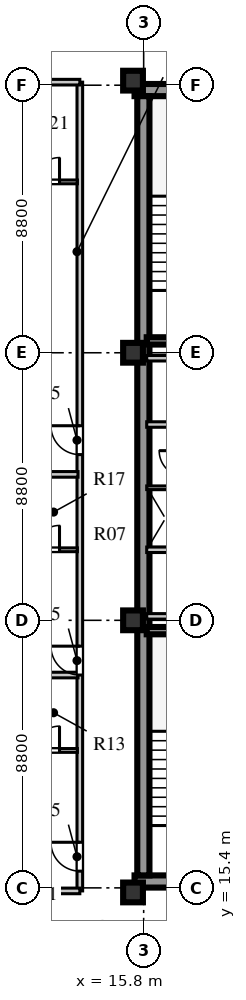
"""IFC4 building model, lengths in metres.
Left out: names, types, materials, properties, quantities, classifications, styles, units other than length and angle.
Written with IfcOpenShell. Run it as: python <this file> out.ifc"""

import sys

from ifc_helpers import new_model, si_unit, direction, frame, frame_2d, origin, origin_2d, place, context, subcontext, project, spatial, rectangle, extrude, element, fill, save


model = new_model("IFC4")
c1 = context("Model", 3, precision=1e-05, world=origin(), true_north=direction((0.0, 1.0)))
c2 = subcontext(c1, "Body", "Model", "MODEL_VIEW")
j1 = project(units=[si_unit("LENGTHUNIT", "METRE"), si_unit("PLANEANGLEUNIT", "RADIAN")], contexts=[c1])
p1 = place(None, origin())
s1 = spatial("IfcSite", under=j1, at=p1, CompositionType="ELEMENT")
p2 = place(p1, origin())
s2 = spatial("IfcBuilding", under=s1, at=p2, CompositionType="ELEMENT")
p3 = place(p2, frame((0.0, 0.0, 260.9)))
s3 = spatial("IfcBuildingStorey", under=s2, at=p3, CompositionType="ELEMENT", Elevation=260.9)
for number, where, z_axis, x_axis in (
    (1, (15.5, 15.61, 0.0), (0.0, 0.0, 1.0), (1.0, 0.0, 0.0)),
    (2, (15.5, 41.64, 0.0), (0.0, 0.0, 1.0), (1.0, 0.0, 0.0)),
):
    element("IfcWall", number, at=place(p3, frame(where, z_axis=z_axis, x_axis=x_axis)), inside=s3, PredefinedType="SHEAR", context=c2, shape_type="SweptSolid", body=[
        extrude(rectangle(XDim=9.48, YDim=0.4, at=frame_2d((4.74, 0.0))), origin(), (0.0, 0.0, 1.0), 3.66),
    ])
p4 = place(p3, frame((15.79, 15.81, 0.0), z_axis=(0.0, 0.0, 1.0), x_axis=(0.0, 1.0, 0.0)))
e3 = element("IfcWall", 3, at=p4, inside=s3, PredefinedType="SHEAR", context=c2, shape_type="SweptSolid", body=[
    extrude(rectangle(XDim=25.63, YDim=0.4, at=frame_2d((12.815, 0.0))), origin(), (0.0, 0.0, 1.0), 3.66),
])
for number, where, z_axis, x_axis in (
    (4, (15.45, 15.25, 0.0), (0.0, 0.0, 1.0), (1.0, 0.0, 0.0)),
    (5, (15.45, 24.2, 0.0), (0.0, 0.0, 1.0), (1.0, 0.0, 0.0)),
    (6, (15.45, 33.0, 0.0), (0.0, 0.0, 1.0), (1.0, 0.0, 0.0)),
    (7, (15.45, 41.95, 0.0), (0.0, 0.0, 1.0), (1.0, 0.0, 0.0)),
):
    element("IfcColumn", number, at=place(p3, frame(where, z_axis=z_axis, x_axis=x_axis)), inside=s3, PredefinedType="COLUMN", context=c2, shape_type="SweptSolid", body=[
        extrude(rectangle(XDim=0.65, YDim=0.65, at=origin_2d()), origin(), (0.0, 0.0, 1.0), 3.66),
    ])
p5 = place(p3, frame((15.9, 23.86, 0.0), z_axis=(0.0, 0.0, 1.0), x_axis=(1.0, 0.0, 0.0)))
e8 = element("IfcWall", 8, at=p5, inside=s3, PredefinedType="SHEAR", context=c2, shape_type="SweptSolid", body=[
    extrude(rectangle(XDim=3.52, YDim=0.24, at=frame_2d((1.76, 0.0))), origin(), (0.0, 0.0, 1.0), 3.9),
])
p6 = place(p3, frame((15.9, 26.52, 0.0), z_axis=(0.0, 0.0, 1.0), x_axis=(1.0, 0.0, 0.0)))
e9 = element("IfcWall", 9, at=p6, inside=s3, PredefinedType="SOLIDWALL", context=c2, shape_type="SweptSolid", body=[
    extrude(rectangle(XDim=8.68, YDim=0.18, at=frame_2d((4.34, 0.0))), origin(), (0.0, 0.0, 1.0), 3.66),
])
p7 = place(p6, frame((2.5, 0.0, 0.0)))
e10 = element("IfcOpeningElement", 10, at=p7, cuts=e9, PredefinedType="OPENING", context=c2, shape_type="SweptSolid", body=[
    extrude(rectangle(XDim=0.95, YDim=2.1, at=frame_2d((0.475, 1.05))), frame((0.0, 0.1, 0.0), z_axis=(0.0, -1.0, 0.0), x_axis=(1.0, 0.0, 0.0)), (0.0, 0.0, 1.0), 0.2),
])
p8 = place(p6, frame((6.0, 0.0, 0.0)))
e11 = element("IfcOpeningElement", 11, at=p8, cuts=e9, PredefinedType="OPENING", context=c2, shape_type="SweptSolid", body=[
    extrude(rectangle(XDim=0.95, YDim=2.1, at=frame_2d((0.475, 1.05))), frame((0.0, 0.1, 0.0), z_axis=(0.0, -1.0, 0.0), x_axis=(1.0, 0.0, 0.0)), (0.0, 0.0, 1.0), 0.2),
])
p9 = place(p3, frame((15.9, 24.33, 0.0), z_axis=(0.0, 0.0, 1.0), x_axis=(1.0, 0.0, 0.0)))
e12 = element("IfcWall", 12, at=p9, inside=s3, PredefinedType="SOLIDWALL", context=c2, shape_type="SweptSolid", body=[
    extrude(rectangle(XDim=8.68, YDim=0.18, at=frame_2d((4.34, 0.0))), origin(), (0.0, 0.0, 1.0), 3.06),
])
p10 = place(p3, frame((15.9, 28.56, 0.0), z_axis=(0.0, 0.0, 1.0), x_axis=(1.0, 0.0, 0.0)))
e13 = element("IfcWall", 13, at=p10, inside=s3, PredefinedType="PARTITIONING", context=c2, shape_type="SweptSolid", body=[
    extrude(rectangle(XDim=1.2, YDim=0.12, at=frame_2d((0.6, 0.0))), origin(), (0.0, 0.0, 1.0), 3.66),
])
p11 = place(p3, frame((15.9, 30.64, 0.0), z_axis=(0.0, 0.0, 1.0), x_axis=(1.0, 0.0, 0.0)))
e14 = element("IfcWall", 14, at=p11, inside=s3, PredefinedType="SOLIDWALL", context=c2, shape_type="SweptSolid", body=[
    extrude(rectangle(XDim=8.68, YDim=0.18, at=frame_2d((4.34, 0.0))), origin(), (0.0, 0.0, 1.0), 3.66),
])
p12 = place(p11, frame((3.7, 0.0, 0.0)))
e15 = element("IfcOpeningElement", 15, at=p12, cuts=e14, PredefinedType="OPENING", context=c2, shape_type="SweptSolid", body=[
    extrude(rectangle(XDim=0.95, YDim=2.1, at=frame_2d((0.475, 1.05))), frame((0.0, 0.1, 0.0), z_axis=(0.0, -1.0, 0.0), x_axis=(1.0, 0.0, 0.0)), (0.0, 0.0, 1.0), 0.2),
])
p13 = place(p3, frame((15.9, 32.82, 0.0), z_axis=(0.0, 0.0, 1.0), x_axis=(1.0, 0.0, 0.0)))
e16 = element("IfcWall", 16, at=p13, inside=s3, PredefinedType="SOLIDWALL", context=c2, shape_type="SweptSolid", body=[
    extrude(rectangle(XDim=8.68, YDim=0.18, at=frame_2d((4.34, 0.0))), origin(), (0.0, 0.0, 1.0), 3.06),
])
p14 = place(p3, frame((15.9, 33.39, 0.0), z_axis=(0.0, 0.0, 1.0), x_axis=(1.0, 0.0, 0.0)))
e17 = element("IfcWall", 17, at=p14, inside=s3, PredefinedType="SHEAR", context=c2, shape_type="SweptSolid", body=[
    extrude(rectangle(XDim=3.52, YDim=0.24, at=frame_2d((1.76, 0.0))), origin(), (0.0, 0.0, 1.0), 3.9),
])
p15 = place(p3, frame((13.7, 15.3, 0.0), z_axis=(0.0, 0.0, 1.0), x_axis=(0.0, 1.0, 0.0)))
e18 = element("IfcWall", 18, at=p15, inside=s3, PredefinedType="SOLIDWALL", context=c2, shape_type="SweptSolid", body=[
    extrude(rectangle(XDim=26.6, YDim=0.185, at=frame_2d((13.3, 0.0))), origin(), (0.0, 0.0, 1.0), 3.66),
])
p16 = place(p15, frame((0.65, 0.0, 0.0)))
e19 = element("IfcOpeningElement", 19, at=p16, cuts=e18, PredefinedType="OPENING", context=c2, shape_type="SweptSolid", body=[
    extrude(rectangle(XDim=0.95, YDim=2.1, at=frame_2d((0.475, 1.05))), frame((0.0, 0.103, 0.0), z_axis=(0.0, -1.0, 0.0), x_axis=(1.0, 0.0, 0.0)), (0.0, 0.0, 1.0), 0.205),
])
p17 = place(p15, frame((7.1, 0.0, 0.0)))
e20 = element("IfcOpeningElement", 20, at=p17, cuts=e18, PredefinedType="OPENING", context=c2, shape_type="SweptSolid", body=[
    extrude(rectangle(XDim=0.95, YDim=2.1, at=frame_2d((0.475, 1.05))), frame((0.0, 0.103, 0.0), z_axis=(0.0, -1.0, 0.0), x_axis=(1.0, 0.0, 0.0)), (0.0, 0.0, 1.0), 0.205),
])
p18 = place(p15, frame((14.35, 0.0, 0.0)))
e21 = element("IfcOpeningElement", 21, at=p18, cuts=e18, PredefinedType="OPENING", context=c2, shape_type="SweptSolid", body=[
    extrude(rectangle(XDim=0.95, YDim=2.1, at=frame_2d((0.475, 1.05))), frame((0.0, 0.103, 0.0), z_axis=(0.0, -1.0, 0.0), x_axis=(1.0, 0.0, 0.0)), (0.0, 0.0, 1.0), 0.205),
])
for number, where, z_axis, x_axis in (
    (22, (8.08, 15.3, 0.0), (0.0, 0.0, 1.0), (1.0, 0.0, 0.0)),
    (23, (8.08, 41.9, 0.0), (0.0, 0.0, 1.0), (1.0, 0.0, 0.0)),
):
    element("IfcWall", number, at=place(p3, frame(where, z_axis=z_axis, x_axis=x_axis)), inside=s3, PredefinedType="SOLIDWALL", context=c2, shape_type="SweptSolid", body=[
        extrude(rectangle(XDim=5.62, YDim=0.185, at=frame_2d((2.81, 0.0))), origin(), (0.0, 0.0, 1.0), 3.21),
    ])
p19 = place(p3, frame((10.45, 19.92, 0.0), z_axis=(0.0, 0.0, 1.0), x_axis=(1.0, 0.0, 0.0)))
e24 = element("IfcWall", 24, at=p19, inside=s3, PredefinedType="PLUMBINGWALL", context=c2, shape_type="SweptSolid", body=[
    extrude(rectangle(XDim=3.17, YDim=0.125, at=frame_2d((1.585, 0.0))), origin(), (0.0, 0.0, 1.0), 3.66),
])
p20 = place(p19, frame((0.16, 0.0, 0.0)))
e25 = element("IfcOpeningElement", 25, at=p20, cuts=e24, PredefinedType="OPENING", context=c2, shape_type="SweptSolid", body=[
    extrude(rectangle(XDim=0.8, YDim=2.05, at=frame_2d((0.4, 1.025))), frame((0.0, 0.073, 0.0), z_axis=(0.0, -1.0, 0.0), x_axis=(1.0, 0.0, 0.0)), (0.0, 0.0, 1.0), 0.145),
])
p21 = place(p19, frame((1.782, 0.0, 0.0)))
e26 = element("IfcOpeningElement", 26, at=p21, cuts=e24, PredefinedType="OPENING", context=c2, shape_type="SweptSolid", body=[
    extrude(rectangle(XDim=0.8, YDim=2.05, at=frame_2d((0.4, 1.025))), frame((0.0, 0.073, 0.0), z_axis=(0.0, -1.0, 0.0), x_axis=(1.0, 0.0, 0.0)), (0.0, 0.0, 1.0), 0.145),
])
p22 = place(p3, frame((8.08, 22.4, 0.0), z_axis=(0.0, 0.0, 1.0), x_axis=(1.0, 0.0, 0.0)))
e27 = element("IfcWall", 27, at=p22, inside=s3, PredefinedType="SOLIDWALL", context=c2, shape_type="SweptSolid", body=[
    extrude(rectangle(XDim=5.56, YDim=0.185, at=frame_2d((2.78, 0.0))), origin(), (0.0, 0.0, 1.0), 3.66),
])
p23 = place(p3, frame((10.45, 26.52, 0.0), z_axis=(0.0, 0.0, 1.0), x_axis=(1.0, 0.0, 0.0)))
e28 = element("IfcWall", 28, at=p23, inside=s3, PredefinedType="PLUMBINGWALL", context=c2, shape_type="SweptSolid", body=[
    extrude(rectangle(XDim=3.17, YDim=0.125, at=frame_2d((1.585, 0.0))), origin(), (0.0, 0.0, 1.0), 3.66),
])
p24 = place(p23, frame((0.16, 0.0, 0.0)))
e29 = element("IfcOpeningElement", 29, at=p24, cuts=e28, PredefinedType="OPENING", context=c2, shape_type="SweptSolid", body=[
    extrude(rectangle(XDim=0.8, YDim=2.05, at=frame_2d((0.4, 1.025))), frame((0.0, 0.073, 0.0), z_axis=(0.0, -1.0, 0.0), x_axis=(1.0, 0.0, 0.0)), (0.0, 0.0, 1.0), 0.145),
])
p25 = place(p23, frame((1.782, 0.0, 0.0)))
e30 = element("IfcOpeningElement", 30, at=p25, cuts=e28, PredefinedType="OPENING", context=c2, shape_type="SweptSolid", body=[
    extrude(rectangle(XDim=0.8, YDim=2.05, at=frame_2d((0.4, 1.025))), frame((0.0, 0.073, 0.0), z_axis=(0.0, -1.0, 0.0), x_axis=(1.0, 0.0, 0.0)), (0.0, 0.0, 1.0), 0.145),
])
p26 = place(p3, frame((8.08, 29.0, 0.0), z_axis=(0.0, 0.0, 1.0), x_axis=(1.0, 0.0, 0.0)))
e31 = element("IfcWall", 31, at=p26, inside=s3, PredefinedType="SOLIDWALL", context=c2, shape_type="SweptSolid", body=[
    extrude(rectangle(XDim=5.56, YDim=0.185, at=frame_2d((2.78, 0.0))), origin(), (0.0, 0.0, 1.0), 3.66),
])
p27 = place(p3, frame((10.45, 38.62, 0.0), z_axis=(0.0, 0.0, 1.0), x_axis=(1.0, 0.0, 0.0)))
e32 = element("IfcWall", 32, at=p27, inside=s3, PredefinedType="PLUMBINGWALL", context=c2, shape_type="SweptSolid", body=[
    extrude(rectangle(XDim=3.17, YDim=0.125, at=frame_2d((1.585, 0.0))), origin(), (0.0, 0.0, 1.0), 3.66),
])
p28 = place(p27, frame((0.16, 0.0, 0.0)))
e33 = element("IfcOpeningElement", 33, at=p28, cuts=e32, PredefinedType="OPENING", context=c2, shape_type="SweptSolid", body=[
    extrude(rectangle(XDim=0.8, YDim=2.05, at=frame_2d((0.4, 1.025))), frame((0.0, 0.073, 0.0), z_axis=(0.0, -1.0, 0.0), x_axis=(1.0, 0.0, 0.0)), (0.0, 0.0, 1.0), 0.145),
])
p29 = place(p27, frame((1.782, 0.0, 0.0)))
e34 = element("IfcOpeningElement", 34, at=p29, cuts=e32, PredefinedType="OPENING", context=c2, shape_type="SweptSolid", body=[
    extrude(rectangle(XDim=0.8, YDim=2.05, at=frame_2d((0.4, 1.025))), frame((0.0, 0.073, 0.0), z_axis=(0.0, -1.0, 0.0), x_axis=(1.0, 0.0, 0.0)), (0.0, 0.0, 1.0), 0.145),
])
p30 = place(p21, origin())
e35 = element("IfcDoor", 35, at=p30, inside=s3, OperationType="SINGLE_SWING_RIGHT", PredefinedType="DOOR", context=c2, shape_type="SweptSolid", body=[
    extrude(rectangle(XDim=0.8, YDim=2.05, at=frame_2d((0.4, 1.025))), frame((0.0, 0.025, 0.0), z_axis=(0.0, -1.0, 0.0), x_axis=(1.0, 0.0, 0.0)), (0.0, 0.0, 1.0), 0.05),
])
fill(e26, e35)
p31 = place(p16, frame((0.95, 0.0, 0.0), z_axis=(0.0, 0.0, 1.0), x_axis=(-1.0, 0.0, 0.0)))
e36 = element("IfcDoor", 36, at=p31, inside=s3, OperationType="SINGLE_SWING_LEFT", PredefinedType="DOOR", context=c2, shape_type="SweptSolid", body=[
    extrude(rectangle(XDim=0.95, YDim=2.1, at=frame_2d((0.475, 1.05))), frame((0.0, 0.025, 0.0), z_axis=(0.0, -1.0, 0.0), x_axis=(1.0, 0.0, 0.0)), (0.0, 0.0, 1.0), 0.05),
])
fill(e19, e36)
p32 = place(p25, origin())
e37 = element("IfcDoor", 37, at=p32, inside=s3, OperationType="SINGLE_SWING_RIGHT", PredefinedType="DOOR", context=c2, shape_type="SweptSolid", body=[
    extrude(rectangle(XDim=0.8, YDim=2.05, at=frame_2d((0.4, 1.025))), frame((0.0, 0.025, 0.0), z_axis=(0.0, -1.0, 0.0), x_axis=(1.0, 0.0, 0.0)), (0.0, 0.0, 1.0), 0.05),
])
fill(e30, e37)
p33 = place(p17, frame((0.95, 0.0, 0.0), z_axis=(0.0, 0.0, 1.0), x_axis=(-1.0, 0.0, 0.0)))
e38 = element("IfcDoor", 38, at=p33, inside=s3, OperationType="SINGLE_SWING_LEFT", PredefinedType="DOOR", context=c2, shape_type="SweptSolid", body=[
    extrude(rectangle(XDim=0.95, YDim=2.1, at=frame_2d((0.475, 1.05))), frame((0.0, 0.025, 0.0), z_axis=(0.0, -1.0, 0.0), x_axis=(1.0, 0.0, 0.0)), (0.0, 0.0, 1.0), 0.05),
])
fill(e20, e38)
p34 = place(p29, origin())
e39 = element("IfcDoor", 39, at=p34, inside=s3, OperationType="SINGLE_SWING_RIGHT", PredefinedType="DOOR", context=c2, shape_type="SweptSolid", body=[
    extrude(rectangle(XDim=0.8, YDim=2.05, at=frame_2d((0.4, 1.025))), frame((0.0, 0.025, 0.0), z_axis=(0.0, -1.0, 0.0), x_axis=(1.0, 0.0, 0.0)), (0.0, 0.0, 1.0), 0.05),
])
fill(e34, e39)
p35 = place(p18, frame((0.95, 0.0, 0.0), z_axis=(0.0, 0.0, 1.0), x_axis=(-1.0, 0.0, 0.0)))
e40 = element("IfcDoor", 40, at=p35, inside=s3, OperationType="SINGLE_SWING_LEFT", PredefinedType="DOOR", context=c2, shape_type="SweptSolid", body=[
    extrude(rectangle(XDim=0.95, YDim=2.1, at=frame_2d((0.475, 1.05))), frame((0.0, 0.025, 0.0), z_axis=(0.0, -1.0, 0.0), x_axis=(1.0, 0.0, 0.0)), (0.0, 0.0, 1.0), 0.05),
])
fill(e21, e40)
save(model, sys.argv[1])
